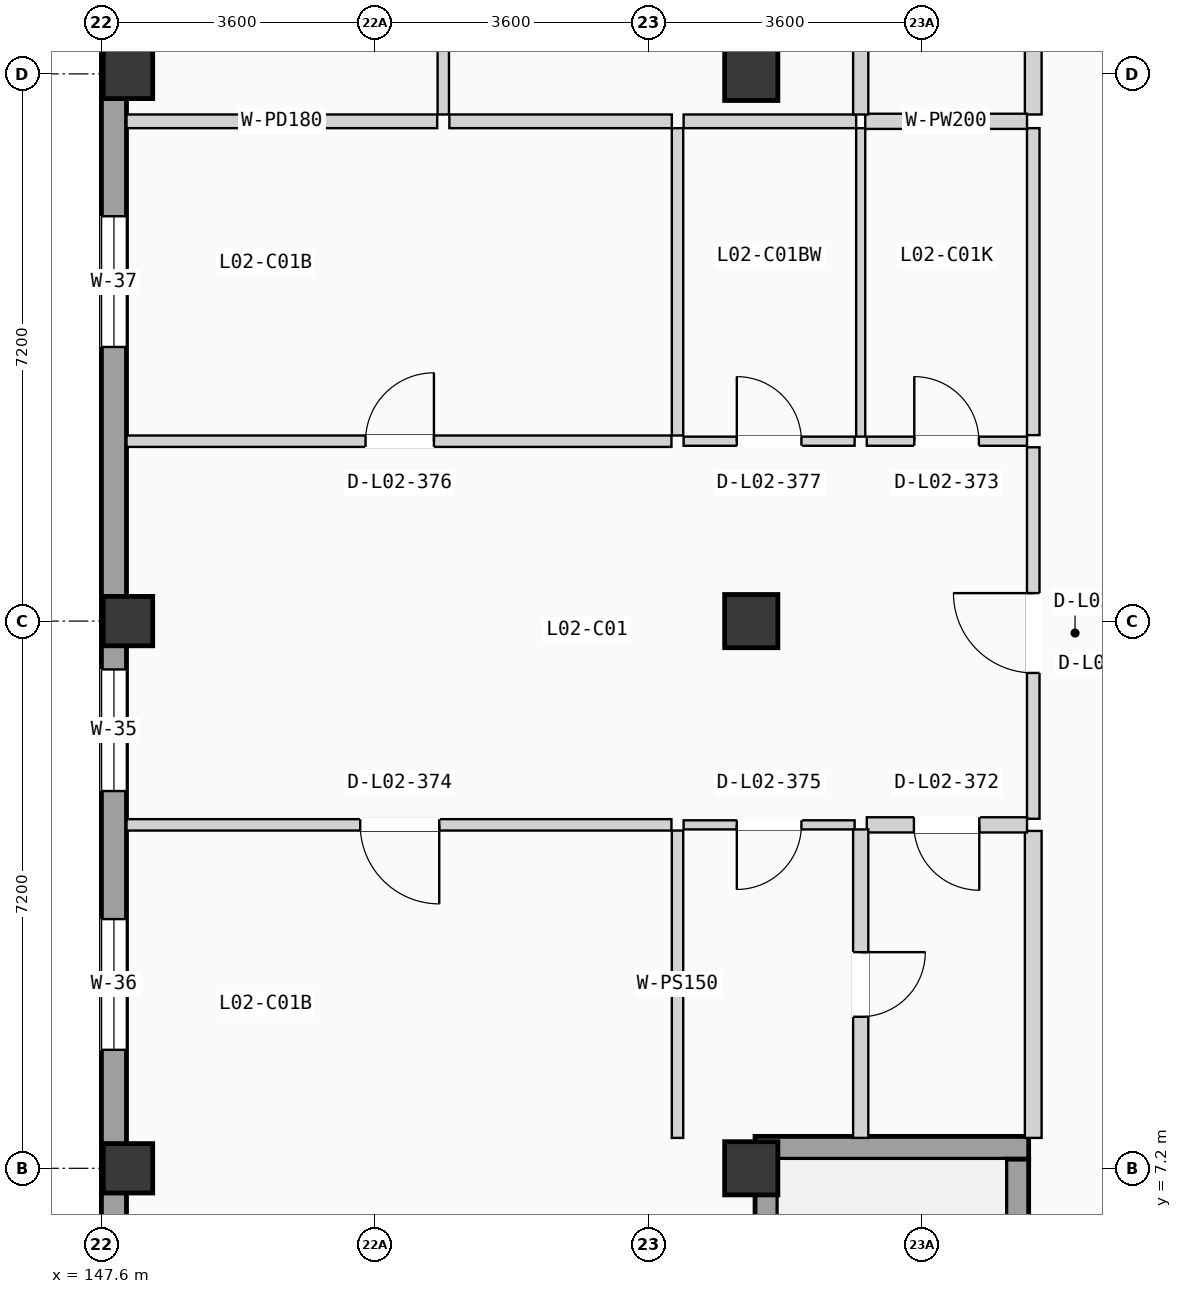
"""IFC4 building model, lengths in metres.
Left out: names, types, materials, properties, quantities, classifications, styles, units other than length and angle.
Written with IfcOpenShell. Run it as: python <this file> out.ifc"""

import sys

from ifc_helpers import new_model, si_unit, direction, frame, frame_2d, origin, origin_2d, place, context, subcontext, project, spatial, rectangle, extrude, element, fill, save


model = new_model("IFC4")
c1 = context("Model", 3, precision=1e-05, world=origin(), true_north=direction((0.0, 1.0)))
c2 = subcontext(c1, "Body", "Model", "MODEL_VIEW")
j1 = project(units=[si_unit("LENGTHUNIT", "METRE"), si_unit("PLANEANGLEUNIT", "RADIAN")], contexts=[c1])
p1 = place(None, origin())
s1 = spatial("IfcSite", under=j1, at=p1, CompositionType="ELEMENT")
p2 = place(p1, origin())
s2 = spatial("IfcBuilding", under=s1, at=p2, CompositionType="ELEMENT")
p3 = place(p2, frame((0.0, 0.0, 8.575)))
s3 = spatial("IfcBuildingStorey", under=s2, at=p3, CompositionType="ELEMENT", Elevation=8.575)
for number, where, z_axis, x_axis in (
    (1, (147.95, 7.2, 0.0), (0.0, 0.0, 1.0), (1.0, 0.0, 0.0)),
    (2, (147.95, 14.4, 0.0), (0.0, 0.0, 1.0), (1.0, 0.0, 0.0)),
    (3, (147.95, 21.6, 0.0), (0.0, 0.0, 1.0), (1.0, 0.0, 0.0)),
):
    element("IfcColumn", number, at=place(p3, frame(where, z_axis=z_axis, x_axis=x_axis)), inside=s3, PredefinedType="COLUMN", context=c2, shape_type="SweptSolid", body=[
        extrude(rectangle(XDim=0.65, YDim=0.65, at=origin_2d()), origin(), (0.0, 0.0, 1.0), 3.5),
    ])
for number, where, z_axis, x_axis in (
    (4, (156.15, 7.2, 0.0), (0.0, 0.0, 1.0), (1.0, 0.0, 0.0)),
    (5, (156.15, 14.4, 0.0), (0.0, 0.0, 1.0), (1.0, 0.0, 0.0)),
    (6, (156.15, 21.6, 0.0), (0.0, 0.0, 1.0), (1.0, 0.0, 0.0)),
):
    element("IfcColumn", number, at=place(p3, frame(where, z_axis=z_axis, x_axis=x_axis)), inside=s3, PredefinedType="COLUMN", context=c2, shape_type="SweptSolid", body=[
        extrude(rectangle(XDim=0.7, YDim=0.7, at=origin_2d()), origin(), (0.0, 0.0, 1.0), 3.5),
    ])
p4 = place(p3, frame((147.765, 0.33, 0.0), z_axis=(0.0, 0.0, 1.0), x_axis=(0.0, 1.0, 0.0)))
e7 = element("IfcWall", 7, at=p4, inside=s3, PredefinedType="SOLIDWALL", context=c2, shape_type="SweptSolid", body=[
    extrude(rectangle(XDim=49.74, YDim=0.33, at=frame_2d((24.87, 0.0))), origin(), (0.0, 0.0, 1.0), 3.24),
])
p5 = place(p4, frame((11.834, 0.0, 0.755)))
e8 = element("IfcOpeningElement", 8, at=p5, cuts=e7, PredefinedType="OPENING", context=c2, shape_type="SweptSolid", body=[
    extrude(rectangle(XDim=1.6, YDim=1.8, at=frame_2d((0.8, 0.9))), frame((0.0, 0.175, 0.0), z_axis=(0.0, -1.0, 0.0), x_axis=(1.0, 0.0, 0.0)), (0.0, 0.0, 1.0), 0.35),
])
p6 = place(p4, frame((8.429, 0.0, 0.9)))
e9 = element("IfcOpeningElement", 9, at=p6, cuts=e7, PredefinedType="OPENING", context=c2, shape_type="SweptSolid", body=[
    extrude(rectangle(XDim=1.72, YDim=1.2, at=frame_2d((0.86, 0.6))), frame((0.0, 0.175, 0.0), z_axis=(0.0, -1.0, 0.0), x_axis=(1.0, 0.0, 0.0)), (0.0, 0.0, 1.0), 0.35),
])
p7 = place(p4, frame((17.677, 0.0, 0.9)))
e10 = element("IfcOpeningElement", 10, at=p7, cuts=e7, PredefinedType="OPENING", context=c2, shape_type="SweptSolid", body=[
    extrude(rectangle(XDim=1.72, YDim=1.35, at=frame_2d((0.86, 0.675))), frame((0.0, 0.175, 0.0), z_axis=(0.0, -1.0, 0.0), x_axis=(1.0, 0.0, 0.0)), (0.0, 0.0, 1.0), 0.35),
])
p8 = place(p4, frame((31.21, 0.0, 0.9)))
e11 = element("IfcOpeningElement", 11, at=p8, cuts=e7, PredefinedType="OPENING", context=c2, shape_type="SweptSolid", body=[
    extrude(rectangle(XDim=1.72, YDim=1.5, at=frame_2d((0.86, 0.75))), frame((0.0, 0.175, 0.0), z_axis=(0.0, -1.0, 0.0), x_axis=(1.0, 0.0, 0.0)), (0.0, 0.0, 1.0), 0.35),
])
p9 = place(p4, frame((24.01, 0.0, 0.9)))
e12 = element("IfcOpeningElement", 12, at=p9, cuts=e7, PredefinedType="OPENING", context=c2, shape_type="SweptSolid", body=[
    extrude(rectangle(XDim=1.72, YDim=1.65, at=frame_2d((0.86, 0.825))), frame((0.0, 0.175, 0.0), z_axis=(0.0, -1.0, 0.0), x_axis=(1.0, 0.0, 0.0)), (0.0, 0.0, 1.0), 0.35),
])
p10 = place(p4, frame((38.345, 0.0, 0.755)))
e13 = element("IfcOpeningElement", 13, at=p10, cuts=e7, PredefinedType="OPENING", context=c2, shape_type="SweptSolid", body=[
    extrude(rectangle(XDim=1.72, YDim=1.8, at=frame_2d((0.86, 0.9))), frame((0.0, 0.175, 0.0), z_axis=(0.0, -1.0, 0.0), x_axis=(1.0, 0.0, 0.0)), (0.0, 0.0, 1.0), 0.35),
])
p11 = place(p3, frame((156.2, 7.47, 0.0), z_axis=(0.0, 0.0, 1.0), x_axis=(1.0, 0.0, 0.0)))
e14 = element("IfcWall", 14, at=p11, inside=s3, PredefinedType="SHEAR", context=c2, shape_type="SweptSolid", body=[
    extrude(rectangle(XDim=3.6, YDim=0.3, at=frame_2d((1.8, 0.0))), origin(), (0.0, 0.0, 1.0), 3.24),
])
p12 = place(p3, frame((156.35, 0.32, 0.0), z_axis=(0.0, 0.0, 1.0), x_axis=(0.0, 1.0, 0.0)))
e15 = element("IfcWall", 15, at=p12, inside=s3, PredefinedType="SHEAR", context=c2, shape_type="SweptSolid", body=[
    extrude(rectangle(XDim=7.0, YDim=0.3, at=frame_2d((3.5, 0.0))), origin(), (0.0, 0.0, 1.0), 3.24),
])
p13 = place(p3, frame((159.65, 0.32, 0.0), z_axis=(0.0, 0.0, 1.0), x_axis=(0.0, 1.0, 0.0)))
e16 = element("IfcWall", 16, at=p13, inside=s3, PredefinedType="SHEAR", context=c2, shape_type="SweptSolid", body=[
    extrude(rectangle(XDim=7.0, YDim=0.3, at=frame_2d((3.5, 0.0))), origin(), (0.0, 0.0, 1.0), 3.24),
])
p14 = place(p13, frame((0.225, 0.0, 0.0)))
e17 = element("IfcOpeningElement", 17, at=p14, cuts=e16, PredefinedType="OPENING", context=c2, shape_type="SweptSolid", body=[
    extrude(rectangle(XDim=1.15, YDim=2.12, at=frame_2d((0.575, 1.06))), frame((0.0, 0.16, 0.0), z_axis=(0.0, -1.0, 0.0), x_axis=(1.0, 0.0, 0.0)), (0.0, 0.0, 1.0), 0.32),
])
p15 = place(p3, frame((159.86, 11.799, 0.0), z_axis=(0.0, 0.0, 1.0), x_axis=(0.0, 1.0, 0.0)))
e18 = element("IfcWall", 18, at=p15, inside=s3, PredefinedType="PARTITIONING", context=c2, shape_type="SweptSolid", body=[
    extrude(rectangle(XDim=4.888, YDim=0.165, at=frame_2d((2.444, 0.0))), origin(), (0.0, 0.0, 1.0), 3.22),
])
p16 = place(p15, frame((1.919, 0.0, 0.0)))
e19 = element("IfcOpeningElement", 19, at=p16, cuts=e18, PredefinedType="OPENING", context=c2, shape_type="SweptSolid", body=[
    extrude(rectangle(XDim=1.05, YDim=2.13, at=frame_2d((0.525, 1.065))), frame((0.0, 0.093, 0.0), z_axis=(0.0, -1.0, 0.0), x_axis=(1.0, 0.0, 0.0)), (0.0, 0.0, 1.0), 0.185),
])
p17 = place(p3, frame((159.86, 7.6, 0.0), z_axis=(0.0, 0.0, 1.0), x_axis=(0.0, 1.0, 0.0)))
e20 = element("IfcWall", 20, at=p17, inside=s3, PredefinedType="PLUMBINGWALL", context=c2, shape_type="SweptSolid", body=[
    extrude(rectangle(XDim=4.039, YDim=0.22, at=frame_2d((2.02, 0.0))), origin(), (0.0, 0.0, 1.0), 3.22),
])
p18 = place(p3, frame((159.86, 16.847, 0.0), z_axis=(0.0, 0.0, 1.0), x_axis=(0.0, 1.0, 0.0)))
e21 = element("IfcWall", 21, at=p18, inside=s3, PredefinedType="PARTITIONING", context=c2, shape_type="SweptSolid", body=[
    extrude(rectangle(XDim=4.039, YDim=0.165, at=frame_2d((2.02, 0.0))), origin(), (0.0, 0.0, 1.0), 3.22),
])
p19 = place(p3, frame((159.86, 21.066, 0.0), z_axis=(0.0, 0.0, 1.0), x_axis=(0.0, 1.0, 0.0)))
e22 = element("IfcWall", 22, at=p19, inside=s3, PredefinedType="PLUMBINGWALL", context=c2, shape_type="SweptSolid", body=[
    extrude(rectangle(XDim=8.604, YDim=0.22, at=frame_2d((4.302, 0.0))), origin(), (0.0, 0.0, 1.0), 3.22),
])
p20 = place(p3, frame((157.67, 11.719, 0.0), z_axis=(0.0, 0.0, 1.0), x_axis=(1.0, 0.0, 0.0)))
e23 = element("IfcWall", 23, at=p20, inside=s3, PredefinedType="PLUMBINGWALL", context=c2, shape_type="SweptSolid", body=[
    extrude(rectangle(XDim=2.108, YDim=0.2, at=frame_2d((1.054, 0.0))), origin(), (0.0, 0.0, 1.0), 3.22),
])
p21 = place(p20, frame((0.62, 0.0, 0.0)))
e24 = element("IfcOpeningElement", 24, at=p21, cuts=e23, PredefinedType="OPENING", context=c2, shape_type="SweptSolid", body=[
    extrude(rectangle(XDim=0.86, YDim=2.0, at=frame_2d((0.43, 1.0))), frame((0.0, 0.11, 0.0), z_axis=(0.0, -1.0, 0.0), x_axis=(1.0, 0.0, 0.0)), (0.0, 0.0, 1.0), 0.22),
])
p22 = place(p3, frame((157.67, 16.767, 0.0), z_axis=(0.0, 0.0, 1.0), x_axis=(1.0, 0.0, 0.0)))
e25 = element("IfcWall", 25, at=p22, inside=s3, PredefinedType="PARTITIONING", context=c2, shape_type="SweptSolid", body=[
    extrude(rectangle(XDim=2.108, YDim=0.12, at=frame_2d((1.054, 0.0))), origin(), (0.0, 0.0, 1.0), 3.22),
])
p23 = place(p22, frame((0.625, 0.0, 0.0)))
e26 = element("IfcOpeningElement", 26, at=p23, cuts=e25, PredefinedType="OPENING", context=c2, shape_type="SweptSolid", body=[
    extrude(rectangle(XDim=0.85, YDim=2.01, at=frame_2d((0.425, 1.005))), frame((0.0, 0.07, 0.0), z_axis=(0.0, -1.0, 0.0), x_axis=(1.0, 0.0, 0.0)), (0.0, 0.0, 1.0), 0.14),
])
p24 = place(p3, frame((147.93, 11.719, 0.0), z_axis=(0.0, 0.0, 1.0), x_axis=(1.0, 0.0, 0.0)))
e27 = element("IfcWall", 27, at=p24, inside=s3, PredefinedType="PARTITIONING", context=c2, shape_type="SweptSolid", body=[
    extrude(rectangle(XDim=7.17, YDim=0.15, at=frame_2d((3.585, 0.0))), origin(), (0.0, 0.0, 1.0), 3.22),
])
p25 = place(p24, frame((3.075, 0.0, 0.0)))
e28 = element("IfcOpeningElement", 28, at=p25, cuts=e27, PredefinedType="OPENING", context=c2, shape_type="SweptSolid", body=[
    extrude(rectangle(XDim=1.04, YDim=2.08, at=frame_2d((0.52, 1.04))), frame((0.0, 0.085, 0.0), z_axis=(0.0, -1.0, 0.0), x_axis=(1.0, 0.0, 0.0)), (0.0, 0.0, 1.0), 0.17),
])
p26 = place(p3, frame((155.26, 11.719, 0.0), z_axis=(0.0, 0.0, 1.0), x_axis=(1.0, 0.0, 0.0)))
e29 = element("IfcWall", 29, at=p26, inside=s3, PredefinedType="PARTITIONING", context=c2, shape_type="SweptSolid", body=[
    extrude(rectangle(XDim=2.25, YDim=0.12, at=frame_2d((1.125, 0.0))), origin(), (0.0, 0.0, 1.0), 3.22),
])
p27 = place(p26, frame((0.7, 0.0, 0.0)))
e30 = element("IfcOpeningElement", 30, at=p27, cuts=e29, PredefinedType="OPENING", context=c2, shape_type="SweptSolid", body=[
    extrude(rectangle(XDim=0.85, YDim=2.01, at=frame_2d((0.425, 1.005))), frame((0.0, 0.07, 0.0), z_axis=(0.0, -1.0, 0.0), x_axis=(1.0, 0.0, 0.0)), (0.0, 0.0, 1.0), 0.14),
])
p28 = place(p3, frame((147.93, 16.767, 0.0), z_axis=(0.0, 0.0, 1.0), x_axis=(1.0, 0.0, 0.0)))
e31 = element("IfcWall", 31, at=p28, inside=s3, PredefinedType="PARTITIONING", context=c2, shape_type="SweptSolid", body=[
    extrude(rectangle(XDim=7.17, YDim=0.15, at=frame_2d((3.585, 0.0))), origin(), (0.0, 0.0, 1.0), 3.22),
])
p29 = place(p28, frame((3.145, 0.0, 0.0)))
e32 = element("IfcOpeningElement", 32, at=p29, cuts=e31, PredefinedType="OPENING", context=c2, shape_type="SweptSolid", body=[
    extrude(rectangle(XDim=0.9, YDim=2.04, at=frame_2d((0.45, 1.02))), frame((0.0, 0.085, 0.0), z_axis=(0.0, -1.0, 0.0), x_axis=(1.0, 0.0, 0.0)), (0.0, 0.0, 1.0), 0.17),
])
p30 = place(p3, frame((155.26, 16.767, 0.0), z_axis=(0.0, 0.0, 1.0), x_axis=(1.0, 0.0, 0.0)))
e33 = element("IfcWall", 33, at=p30, inside=s3, PredefinedType="PARTITIONING", context=c2, shape_type="SweptSolid", body=[
    extrude(rectangle(XDim=2.25, YDim=0.12, at=frame_2d((1.125, 0.0))), origin(), (0.0, 0.0, 1.0), 3.22),
])
p31 = place(p30, frame((0.7, 0.0, 0.0)))
e34 = element("IfcOpeningElement", 34, at=p31, cuts=e33, PredefinedType="OPENING", context=c2, shape_type="SweptSolid", body=[
    extrude(rectangle(XDim=0.85, YDim=2.01, at=frame_2d((0.425, 1.005))), frame((0.0, 0.07, 0.0), z_axis=(0.0, -1.0, 0.0), x_axis=(1.0, 0.0, 0.0)), (0.0, 0.0, 1.0), 0.14),
])
p32 = place(p3, frame((157.59, 7.6, 0.0), z_axis=(0.0, 0.0, 1.0), x_axis=(0.0, 1.0, 0.0)))
e35 = element("IfcWall", 35, at=p32, inside=s3, PredefinedType="PLUMBINGWALL", context=c2, shape_type="SweptSolid", body=[
    extrude(rectangle(XDim=4.059, YDim=0.2, at=frame_2d((2.029, 0.0))), origin(), (0.0, 0.0, 1.0), 3.22),
])
p33 = place(p32, frame((1.594, 0.0, 0.0)))
e36 = element("IfcOpeningElement", 36, at=p33, cuts=e35, PredefinedType="OPENING", context=c2, shape_type="SweptSolid", body=[
    extrude(rectangle(XDim=0.85, YDim=2.01, at=frame_2d((0.425, 1.005))), frame((0.0, 0.11, 0.0), z_axis=(0.0, -1.0, 0.0), x_axis=(1.0, 0.0, 0.0)), (0.0, 0.0, 1.0), 0.22),
])
p34 = place(p3, frame((157.59, 16.827, 0.0), z_axis=(0.0, 0.0, 1.0), x_axis=(0.0, 1.0, 0.0)))
e37 = element("IfcWall", 37, at=p34, inside=s3, PredefinedType="PARTITIONING", context=c2, shape_type="SweptSolid", body=[
    extrude(rectangle(XDim=4.059, YDim=0.12, at=frame_2d((2.03, 0.0))), origin(), (0.0, 0.0, 1.0), 3.22),
])
p35 = place(p3, frame((157.65, 20.976, 0.0), z_axis=(0.0, 0.0, 1.0), x_axis=(1.0, 0.0, 0.0)))
e38 = element("IfcWall", 38, at=p35, inside=s3, PredefinedType="PLUMBINGWALL", context=c2, shape_type="SweptSolid", body=[
    extrude(rectangle(XDim=2.128, YDim=0.2, at=frame_2d((1.064, 0.0))), origin(), (0.0, 0.0, 1.0), 3.22),
])
for number, where, z_axis, x_axis in (
    (39, (155.18, 7.6, 0.0), (0.0, 0.0, 1.0), (0.0, 1.0, 0.0)),
    (40, (155.18, 16.842, 0.0), (0.0, 0.0, 1.0), (0.0, 1.0, 0.0)),
):
    element("IfcWall", number, at=place(p3, frame(where, z_axis=z_axis, x_axis=x_axis)), inside=s3, PredefinedType="PARTITIONING", context=c2, shape_type="SweptSolid", body=[
        extrude(rectangle(XDim=4.044, YDim=0.15, at=frame_2d((2.022, 0.0))), origin(), (0.0, 0.0, 1.0), 3.22),
    ])
p36 = place(p3, frame((147.93, 20.976, 0.0), z_axis=(0.0, 0.0, 1.0), x_axis=(1.0, 0.0, 0.0)))
e41 = element("IfcWall", 41, at=p36, inside=s3, PredefinedType="PARTITIONING", context=c2, shape_type="SweptSolid", body=[
    extrude(rectangle(XDim=4.088, YDim=0.18, at=frame_2d((2.044, 0.0))), origin(), (0.0, 0.0, 1.0), 3.22),
])
p37 = place(p3, frame((152.178, 20.976, 0.0), z_axis=(0.0, 0.0, 1.0), x_axis=(1.0, 0.0, 0.0)))
e42 = element("IfcWall", 42, at=p37, inside=s3, PredefinedType="PARTITIONING", context=c2, shape_type="SweptSolid", body=[
    extrude(rectangle(XDim=2.927, YDim=0.18, at=frame_2d((1.463, 0.0))), origin(), (0.0, 0.0, 1.0), 3.22),
])
p38 = place(p3, frame((155.26, 20.976, 0.0), z_axis=(0.0, 0.0, 1.0), x_axis=(1.0, 0.0, 0.0)))
e43 = element("IfcWall", 43, at=p38, inside=s3, PredefinedType="PARTITIONING", context=c2, shape_type="SweptSolid", body=[
    extrude(rectangle(XDim=2.27, YDim=0.18, at=frame_2d((1.135, 0.0))), origin(), (0.0, 0.0, 1.0), 3.22),
])
p39 = place(p3, frame((157.59, 21.066, 0.0), z_axis=(0.0, 0.0, 1.0), x_axis=(0.0, 1.0, 0.0)))
e44 = element("IfcWall", 44, at=p39, inside=s3, PredefinedType="PLUMBINGWALL", context=c2, shape_type="SweptSolid", body=[
    extrude(rectangle(XDim=8.624, YDim=0.2, at=frame_2d((4.312, 0.0))), origin(), (0.0, 0.0, 1.0), 3.22),
])
p40 = place(p39, frame((3.877, 0.0, 0.0)))
e45 = element("IfcOpeningElement", 45, at=p40, cuts=e44, PredefinedType="OPENING", context=c2, shape_type="SweptSolid", body=[
    extrude(rectangle(XDim=0.85, YDim=2.01, at=frame_2d((0.425, 1.005))), frame((0.0, 0.11, 0.0), z_axis=(0.0, -1.0, 0.0), x_axis=(1.0, 0.0, 0.0)), (0.0, 0.0, 1.0), 0.22),
])
p41 = place(p3, frame((152.098, 21.066, 0.0), z_axis=(0.0, 0.0, 1.0), x_axis=(0.0, 1.0, 0.0)))
e46 = element("IfcWall", 46, at=p41, inside=s3, PredefinedType="PARTITIONING", context=c2, shape_type="SweptSolid", body=[
    extrude(rectangle(XDim=8.624, YDim=0.15, at=frame_2d((4.312, 0.0))), origin(), (0.0, 0.0, 1.0), 3.22),
])
p42 = place(p5, origin())
e47 = element("IfcWindow", 47, at=p42, inside=s3, PartitioningType="DOUBLE_PANEL_VERTICAL", PredefinedType="WINDOW", context=c2, shape_type="SweptSolid", body=[
    extrude(rectangle(XDim=1.6, YDim=1.8, at=frame_2d((0.8, 0.9))), frame((0.0, 0.03, 0.0), z_axis=(0.0, -1.0, 0.0), x_axis=(1.0, 0.0, 0.0)), (0.0, 0.0, 1.0), 0.06),
])
fill(e8, e47)
p43 = place(p6, origin())
e48 = element("IfcWindow", 48, at=p43, inside=s3, PartitioningType="DOUBLE_PANEL_VERTICAL", PredefinedType="WINDOW", context=c2, shape_type="SweptSolid", body=[
    extrude(rectangle(XDim=1.72, YDim=1.2, at=frame_2d((0.86, 0.6))), frame((0.0, 0.03, 0.0), z_axis=(0.0, -1.0, 0.0), x_axis=(1.0, 0.0, 0.0)), (0.0, 0.0, 1.0), 0.06),
])
fill(e9, e48)
p44 = place(p7, origin())
e49 = element("IfcWindow", 49, at=p44, inside=s3, PartitioningType="DOUBLE_PANEL_VERTICAL", PredefinedType="WINDOW", context=c2, shape_type="SweptSolid", body=[
    extrude(rectangle(XDim=1.72, YDim=1.35, at=frame_2d((0.86, 0.675))), frame((0.0, 0.03, 0.0), z_axis=(0.0, -1.0, 0.0), x_axis=(1.0, 0.0, 0.0)), (0.0, 0.0, 1.0), 0.06),
])
fill(e10, e49)
p45 = place(p16, origin())
e50 = element("IfcDoor", 50, at=p45, inside=s3, OperationType="SINGLE_SWING_RIGHT", PredefinedType="DOOR", context=c2, shape_type="SweptSolid", body=[
    extrude(rectangle(XDim=1.05, YDim=2.13, at=frame_2d((0.525, 1.065))), frame((0.0, 0.025, 0.0), z_axis=(0.0, -1.0, 0.0), x_axis=(1.0, 0.0, 0.0)), (0.0, 0.0, 1.0), 0.05),
])
fill(e19, e50)
p46 = place(p21, frame((0.86, 0.0, 0.0), z_axis=(0.0, 0.0, 1.0), x_axis=(-1.0, 0.0, 0.0)))
e51 = element("IfcDoor", 51, at=p46, inside=s3, OperationType="SINGLE_SWING_RIGHT", PredefinedType="DOOR", context=c2, shape_type="SweptSolid", body=[
    extrude(rectangle(XDim=0.86, YDim=2.0, at=frame_2d((0.43, 1.0))), frame((0.0, 0.025, 0.0), z_axis=(0.0, -1.0, 0.0), x_axis=(1.0, 0.0, 0.0)), (0.0, 0.0, 1.0), 0.05),
])
fill(e24, e51)
p47 = place(p23, origin())
e52 = element("IfcDoor", 52, at=p47, inside=s3, OperationType="SINGLE_SWING_LEFT", PredefinedType="DOOR", context=c2, shape_type="SweptSolid", body=[
    extrude(rectangle(XDim=0.85, YDim=2.01, at=frame_2d((0.425, 1.005))), frame((0.0, 0.025, 0.0), z_axis=(0.0, -1.0, 0.0), x_axis=(1.0, 0.0, 0.0)), (0.0, 0.0, 1.0), 0.05),
])
fill(e26, e52)
p48 = place(p25, frame((1.04, 0.0, 0.0), z_axis=(0.0, 0.0, 1.0), x_axis=(-1.0, 0.0, 0.0)))
e53 = element("IfcDoor", 53, at=p48, inside=s3, OperationType="SINGLE_SWING_RIGHT", PredefinedType="DOOR", context=c2, shape_type="SweptSolid", body=[
    extrude(rectangle(XDim=1.04, YDim=2.08, at=frame_2d((0.52, 1.04))), frame((0.0, 0.025, 0.0), z_axis=(0.0, -1.0, 0.0), x_axis=(1.0, 0.0, 0.0)), (0.0, 0.0, 1.0), 0.05),
])
fill(e28, e53)
p49 = place(p27, frame((0.85, 0.0, 0.0), z_axis=(0.0, 0.0, 1.0), x_axis=(-1.0, 0.0, 0.0)))
e54 = element("IfcDoor", 54, at=p49, inside=s3, OperationType="SINGLE_SWING_LEFT", PredefinedType="DOOR", context=c2, shape_type="SweptSolid", body=[
    extrude(rectangle(XDim=0.85, YDim=2.01, at=frame_2d((0.425, 1.005))), frame((0.0, 0.025, 0.0), z_axis=(0.0, -1.0, 0.0), x_axis=(1.0, 0.0, 0.0)), (0.0, 0.0, 1.0), 0.05),
])
fill(e30, e54)
p50 = place(p29, origin())
e55 = element("IfcDoor", 55, at=p50, inside=s3, OperationType="SINGLE_SWING_RIGHT", PredefinedType="DOOR", context=c2, shape_type="SweptSolid", body=[
    extrude(rectangle(XDim=0.9, YDim=2.04, at=frame_2d((0.45, 1.02))), frame((0.0, 0.025, 0.0), z_axis=(0.0, -1.0, 0.0), x_axis=(1.0, 0.0, 0.0)), (0.0, 0.0, 1.0), 0.05),
])
fill(e32, e55)
p51 = place(p31, origin())
e56 = element("IfcDoor", 56, at=p51, inside=s3, OperationType="SINGLE_SWING_LEFT", PredefinedType="DOOR", context=c2, shape_type="SweptSolid", body=[
    extrude(rectangle(XDim=0.85, YDim=2.01, at=frame_2d((0.425, 1.005))), frame((0.0, 0.025, 0.0), z_axis=(0.0, -1.0, 0.0), x_axis=(1.0, 0.0, 0.0)), (0.0, 0.0, 1.0), 0.05),
])
fill(e34, e56)
p52 = place(p33, frame((0.85, 0.0, 0.0), z_axis=(0.0, 0.0, 1.0), x_axis=(-1.0, 0.0, 0.0)))
e57 = element("IfcDoor", 57, at=p52, inside=s3, OperationType="SINGLE_SWING_RIGHT", PredefinedType="DOOR", context=c2, shape_type="SweptSolid", body=[
    extrude(rectangle(XDim=0.85, YDim=2.01, at=frame_2d((0.425, 1.005))), frame((0.0, 0.025, 0.0), z_axis=(0.0, -1.0, 0.0), x_axis=(1.0, 0.0, 0.0)), (0.0, 0.0, 1.0), 0.05),
])
fill(e36, e57)
save(model, sys.argv[1])
